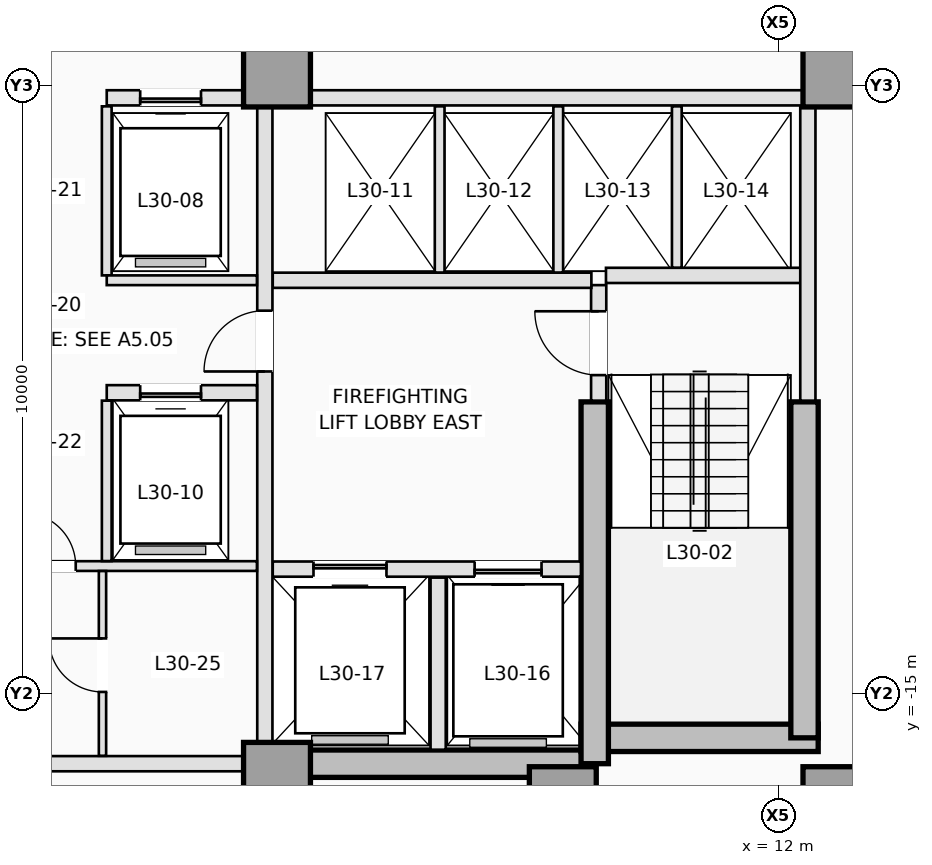
"""IFC4 building model, lengths in metres.
Left out: names, types, materials, properties, quantities, classifications, styles, units other than length and angle.
Written with IfcOpenShell. Run it as: python <this file> out.ifc"""

import sys

from ifc_helpers import new_model, si_unit, direction, frame, frame_2d, origin, origin_2d, place, context, subcontext, project, spatial, rectangle, extrude, element, fill, save


model = new_model("IFC4")
c1 = context("Model", 3, precision=1e-05, world=origin(), true_north=direction((0.0, 1.0)))
c2 = subcontext(c1, "Body", "Model", "MODEL_VIEW")
j1 = project(units=[si_unit("LENGTHUNIT", "METRE"), si_unit("PLANEANGLEUNIT", "RADIAN")], contexts=[c1])
p1 = place(None, origin())
s1 = spatial("IfcSite", under=j1, at=p1, CompositionType="ELEMENT")
p2 = place(p1, origin())
s2 = spatial("IfcBuilding", under=s1, at=p2, CompositionType="ELEMENT")
p3 = place(p2, frame((0.0, 0.0, 112.5)))
s3 = spatial("IfcBuildingStorey", under=s2, at=p3, CompositionType="ELEMENT", Elevation=112.5)
p4 = place(p3, frame((3.75, -16.15, 0.0), z_axis=(0.0, 0.0, 1.0), x_axis=(1.0, 0.0, 0.0)))
e1 = element("IfcWall", 1, at=p4, inside=s3, PredefinedType="SHEAR", context=c2, shape_type="SweptSolid", body=[
    extrude(rectangle(XDim=5.225, YDim=0.45, at=frame_2d((2.613, 0.0))), origin(), (0.0, 0.0, 1.0), 3.5),
])
p5 = place(p3, frame((8.75, -15.725, 0.0), z_axis=(0.0, 0.0, 1.0), x_axis=(1.0, 0.0, 0.0)))
e2 = element("IfcWall", 2, at=p5, inside=s3, PredefinedType="SHEAR", context=c2, shape_type="SweptSolid", body=[
    extrude(rectangle(XDim=3.9, YDim=0.45, at=frame_2d((1.95, 0.0))), origin(), (0.0, 0.0, 1.0), 3.5),
])
p6 = place(p3, frame((12.425, -15.725, 0.0), z_axis=(0.0, 0.0, 1.0), x_axis=(0.0, 1.0, 0.0)))
e3 = element("IfcWall", 3, at=p6, inside=s3, PredefinedType="SHEAR", context=c2, shape_type="SweptSolid", body=[
    extrude(rectangle(XDim=5.525, YDim=0.45, at=frame_2d((2.763, 0.0))), origin(), (0.0, 0.0, 1.0), 3.5),
])
p7 = place(p3, frame((8.975, -16.15, 0.0), z_axis=(0.0, 0.0, 1.0), x_axis=(0.0, 1.0, 0.0)))
e4 = element("IfcWall", 4, at=p7, inside=s3, PredefinedType="SHEAR", context=c2, shape_type="SweptSolid", body=[
    extrude(rectangle(XDim=5.95, YDim=0.45, at=frame_2d((2.975, 0.0))), origin(), (0.0, 0.0, 1.0), 3.5),
])
for number, where, z_axis, x_axis in (
    (5, (3.75, -16.35, 0.0), (0.0, 0.0, 1.0), (1.0, 0.0, 0.0)),
    (6, (8.45, -16.75, 0.0), (0.0, 0.0, 1.0), (1.0, 0.0, 0.0)),
    (7, (12.95, -16.75, 0.0), (0.0, 0.0, 1.0), (1.0, 0.0, 0.0)),
    (8, (3.75, -4.8, 0.0), (0.0, 0.0, 1.0), (1.0, 0.0, 0.0)),
    (9, (12.95, -4.8, 0.0), (0.0, 0.0, 1.0), (1.0, 0.0, 0.0)),
):
    element("IfcColumn", number, at=place(p3, frame(where, z_axis=z_axis, x_axis=x_axis)), inside=s3, PredefinedType="COLUMN", context=c2, shape_type="SweptSolid", body=[
        extrude(rectangle(XDim=1.1, YDim=1.1, at=origin_2d()), origin(), (0.0, 0.0, 1.0), 3.5),
    ])
p8 = place(p3, frame((9.04, -10.18, 0.0), z_axis=(0.0, 0.0, 1.0), x_axis=(0.0, 1.0, 0.0)))
e10 = element("IfcWall", 10, at=p8, inside=s3, PredefinedType="PARTITIONING", context=c2, shape_type="SweptSolid", body=[
    extrude(rectangle(XDim=1.9, YDim=0.25, at=frame_2d((0.95, 0.0))), origin(), (0.0, 0.0, 1.0), 3.25),
])
p9 = place(p8, frame((0.42, 0.0, 0.0)))
e11 = element("IfcOpeningElement", 11, at=p9, cuts=e10, PredefinedType="OPENING", context=c2, shape_type="SweptSolid", body=[
    extrude(rectangle(XDim=1.05, YDim=2.15, at=frame_2d((0.525, 1.075))), frame((0.0, 0.135, 0.0), z_axis=(0.0, -1.0, 0.0), x_axis=(1.0, 0.0, 0.0)), (0.0, 0.0, 1.0), 0.27),
])
p10 = place(p3, frame((9.16, -8.12, 0.0), z_axis=(0.0, 0.0, 1.0), x_axis=(1.0, 0.0, 0.0)))
e12 = element("IfcWall", 12, at=p10, inside=s3, PredefinedType="PARTITIONING", context=c2, shape_type="SweptSolid", body=[
    extrude(rectangle(XDim=3.22, YDim=0.25, at=frame_2d((1.61, 0.0))), origin(), (0.0, 0.0, 1.0), 3.25),
])
p11 = place(p3, frame((12.48, -10.18, 0.0), z_axis=(0.0, 0.0, 1.0), x_axis=(0.0, 1.0, 0.0)))
e13 = element("IfcWall", 13, at=p11, inside=s3, PredefinedType="PARTITIONING", context=c2, shape_type="SweptSolid", body=[
    extrude(rectangle(XDim=4.828, YDim=0.25, at=frame_2d((2.414, 0.0))), origin(), (0.0, 0.0, 1.0), 3.25),
])
p12 = place(p3, frame((3.68, -12.95, 0.0), z_axis=(0.0, 0.0, 1.0), x_axis=(1.0, 0.0, 0.0)))
e14 = element("IfcWall", 14, at=p12, inside=s3, PredefinedType="PARTITIONING", context=c2, shape_type="SweptSolid", body=[
    extrude(rectangle(XDim=5.068, YDim=0.25, at=frame_2d((2.534, 0.0))), origin(), (0.0, 0.0, 1.0), 3.25),
])
p13 = place(p12, frame((3.32, 0.0, 0.0)))
e15 = element("IfcOpeningElement", 15, at=p13, cuts=e14, PredefinedType="OPENING", context=c2, shape_type="SweptSolid", body=[
    extrude(rectangle(XDim=1.1, YDim=2.15, at=frame_2d((0.55, 1.075))), frame((0.0, 0.135, 0.0), z_axis=(0.0, -1.0, 0.0), x_axis=(1.0, 0.0, 0.0)), (0.0, 0.0, 1.0), 0.27),
])
p14 = place(p12, frame((0.67, 0.0, 0.0)))
e16 = element("IfcOpeningElement", 16, at=p14, cuts=e14, PredefinedType="OPENING", context=c2, shape_type="SweptSolid", body=[
    extrude(rectangle(XDim=1.2, YDim=2.15, at=frame_2d((0.6, 1.075))), frame((0.0, 0.135, 0.0), z_axis=(0.0, -1.0, 0.0), x_axis=(1.0, 0.0, 0.0)), (0.0, 0.0, 1.0), 0.27),
])
p15 = place(p3, frame((6.4, -15.92, 0.0), z_axis=(0.0, 0.0, 1.0), x_axis=(0.0, 1.0, 0.0)))
e17 = element("IfcWall", 17, at=p15, inside=s3, PredefinedType="PARTITIONING", context=c2, shape_type="SweptSolid", body=[
    extrude(rectangle(XDim=2.83, YDim=0.25, at=frame_2d((1.415, 0.0))), origin(), (0.0, 0.0, 1.0), 3.25),
])
p16 = place(p3, frame((3.68, -8.2, 0.0), z_axis=(0.0, 0.0, 1.0), x_axis=(1.0, 0.0, 0.0)))
e18 = element("IfcWall", 18, at=p16, inside=s3, PredefinedType="PARTITIONING", context=c2, shape_type="SweptSolid", body=[
    extrude(rectangle(XDim=5.24, YDim=0.25, at=frame_2d((2.62, 0.0))), origin(), (0.0, 0.0, 1.0), 3.25),
])
p17 = place(p3, frame((3.55, -15.798, 0.0), z_axis=(0.0, 0.0, 1.0), x_axis=(0.0, 1.0, 0.0)))
e19 = element("IfcWall", 19, at=p17, inside=s3, PredefinedType="PARTITIONING", context=c2, shape_type="SweptSolid", body=[
    extrude(rectangle(XDim=10.446, YDim=0.25, at=frame_2d((5.223, 0.0))), origin(), (0.0, 0.0, 1.0), 3.25),
])
p18 = place(p17, frame((6.098, 0.0, 0.0)))
e20 = element("IfcOpeningElement", 20, at=p18, cuts=e19, PredefinedType="OPENING", context=c2, shape_type="SweptSolid", body=[
    extrude(rectangle(XDim=1.0, YDim=2.15, at=frame_2d((0.5, 1.075))), frame((0.0, 0.135, 0.0), z_axis=(0.0, -1.0, 0.0), x_axis=(1.0, 0.0, 0.0)), (0.0, 0.0, 1.0), 0.27),
])
p19 = place(p3, frame((4.302, -5.2, 0.0), z_axis=(0.0, 0.0, 1.0), x_axis=(1.0, 0.0, 0.0)))
e21 = element("IfcWall", 21, at=p19, inside=s3, PredefinedType="PARTITIONING", context=c2, shape_type="SweptSolid", body=[
    extrude(rectangle(XDim=8.096, YDim=0.25, at=frame_2d((4.048, 0.0))), origin(), (0.0, 0.0, 1.0), 3.25),
])
p20 = place(p3, frame((0.95, -5.2, 0.0), z_axis=(0.0, 0.0, 1.0), x_axis=(1.0, 0.0, 0.0)))
e22 = element("IfcWall", 22, at=p20, inside=s3, PredefinedType="PARTITIONING", context=c2, shape_type="SweptSolid", body=[
    extrude(rectangle(XDim=2.248, YDim=0.25, at=frame_2d((1.124, 0.0))), origin(), (0.0, 0.0, 1.0), 3.25),
])
p21 = place(p20, frame((0.55, 0.0, 0.0)))
e23 = element("IfcOpeningElement", 23, at=p21, cuts=e22, PredefinedType="OPENING", context=c2, shape_type="SweptSolid", body=[
    extrude(rectangle(XDim=1.0, YDim=2.15, at=frame_2d((0.5, 1.075))), frame((0.0, 0.135, 0.0), z_axis=(0.0, -1.0, 0.0), x_axis=(1.0, 0.0, 0.0)), (0.0, 0.0, 1.0), 0.27),
])
for number, where, z_axis, x_axis in (
    (24, (6.425, -8.073, 0.0), (0.0, 0.0, 1.0), (0.0, 1.0, 0.0)),
    (25, (8.375, -8.073, 0.0), (0.0, 0.0, 1.0), (0.0, 1.0, 0.0)),
):
    element("IfcWall", number, at=place(p3, frame(where, z_axis=z_axis, x_axis=x_axis)), inside=s3, PredefinedType="PARTITIONING", context=c2, shape_type="SweptSolid", body=[
        extrude(rectangle(XDim=2.733, YDim=0.16, at=frame_2d((1.366, 0.0))), origin(), (0.0, 0.0, 1.0), 3.25),
    ])
p22 = place(p3, frame((10.325, -7.993, 0.0), z_axis=(0.0, 0.0, 1.0), x_axis=(0.0, 1.0, 0.0)))
e26 = element("IfcWall", 26, at=p22, inside=s3, PredefinedType="PARTITIONING", context=c2, shape_type="SweptSolid", body=[
    extrude(rectangle(XDim=2.653, YDim=0.16, at=frame_2d((1.326, 0.0))), origin(), (0.0, 0.0, 1.0), 3.25),
])
p23 = place(p3, frame((-3.198, -16.15, 0.0), z_axis=(0.0, 0.0, 1.0), x_axis=(1.0, 0.0, 0.0)))
e27 = element("IfcWall", 27, at=p23, inside=s3, PredefinedType="PARTITIONING", context=c2, shape_type="SweptSolid", body=[
    extrude(rectangle(XDim=6.396, YDim=0.25, at=frame_2d((3.198, 0.0))), origin(), (0.0, 0.0, 1.0), 2.3),
])
p24 = place(p3, frame((0.95, -8.12, 0.0), z_axis=(0.0, 0.0, 1.0), x_axis=(0.0, 1.0, 0.0)))
e28 = element("IfcWall", 28, at=p24, inside=s3, PredefinedType="PARTITIONING", context=c2, shape_type="SweptSolid", body=[
    extrude(rectangle(XDim=2.78, YDim=0.16, at=frame_2d((1.39, 0.0))), origin(), (0.0, 0.0, 1.0), 3.25),
])
p25 = place(p3, frame((0.95, -8.2, 0.0), z_axis=(0.0, 0.0, 1.0), x_axis=(1.0, 0.0, 0.0)))
e29 = element("IfcWall", 29, at=p25, inside=s3, PredefinedType="PARTITIONING", context=c2, shape_type="SweptSolid", body=[
    extrude(rectangle(XDim=2.47, YDim=0.16, at=frame_2d((1.235, 0.0))), origin(), (0.0, 0.0, 1.0), 3.25),
])
p26 = place(p3, frame((0.95, -10.05, 0.0), z_axis=(0.0, 0.0, 1.0), x_axis=(1.0, 0.0, 0.0)))
e30 = element("IfcWall", 30, at=p26, inside=s3, PredefinedType="PARTITIONING", context=c2, shape_type="SweptSolid", body=[
    extrude(rectangle(XDim=2.47, YDim=0.25, at=frame_2d((1.235, 0.0))), origin(), (0.0, 0.0, 1.0), 3.25),
])
p27 = place(p26, frame((0.55, 0.0, 0.0)))
e31 = element("IfcOpeningElement", 31, at=p27, cuts=e30, PredefinedType="OPENING", context=c2, shape_type="SweptSolid", body=[
    extrude(rectangle(XDim=1.0, YDim=2.15, at=frame_2d((0.5, 1.075))), frame((0.0, 0.135, 0.0), z_axis=(0.0, -1.0, 0.0), x_axis=(1.0, 0.0, 0.0)), (0.0, 0.0, 1.0), 0.27),
])
p28 = place(p3, frame((-3.42, -12.9, 0.0), z_axis=(0.0, 0.0, 1.0), x_axis=(1.0, 0.0, 0.0)))
e32 = element("IfcWall", 32, at=p28, inside=s3, PredefinedType="PARTITIONING", context=c2, shape_type="SweptSolid", body=[
    extrude(rectangle(XDim=6.84, YDim=0.16, at=frame_2d((3.42, 0.0))), origin(), (0.0, 0.0, 1.0), 3.25),
])
p29 = place(p28, frame((2.98, 0.0, 0.0)))
e33 = element("IfcOpeningElement", 33, at=p29, cuts=e32, PredefinedType="OPENING", context=c2, shape_type="SweptSolid", body=[
    extrude(rectangle(XDim=0.88, YDim=2.12, at=frame_2d((0.44, 1.06))), frame((0.0, 0.09, 0.0), z_axis=(0.0, -1.0, 0.0), x_axis=(1.0, 0.0, 0.0)), (0.0, 0.0, 1.0), 0.18),
])
p30 = place(p3, frame((0.95, -12.818, 0.0), z_axis=(0.0, 0.0, 1.0), x_axis=(0.0, 1.0, 0.0)))
e34 = element("IfcWall", 34, at=p30, inside=s3, PredefinedType="PARTITIONING", context=c2, shape_type="SweptSolid", body=[
    extrude(rectangle(XDim=2.638, YDim=0.16, at=frame_2d((1.319, 0.0))), origin(), (0.0, 0.0, 1.0), 3.25),
])
p31 = place(p3, frame((0.88, -16.02, 0.0), z_axis=(0.0, 0.0, 1.0), x_axis=(0.0, 1.0, 0.0)))
e35 = element("IfcWall", 35, at=p31, inside=s3, PredefinedType="PARTITIONING", context=c2, shape_type="SweptSolid", body=[
    extrude(rectangle(XDim=3.038, YDim=0.12, at=frame_2d((1.519, 0.0))), origin(), (0.0, 0.0, 1.0), 3.25),
])
p32 = place(p31, frame((1.05, 0.0, 0.0)))
e36 = element("IfcOpeningElement", 36, at=p32, cuts=e35, PredefinedType="OPENING", context=c2, shape_type="SweptSolid", body=[
    extrude(rectangle(XDim=0.88, YDim=2.12, at=frame_2d((0.44, 1.06))), frame((0.0, 0.07, 0.0), z_axis=(0.0, -1.0, 0.0), x_axis=(1.0, 0.0, 0.0)), (0.0, 0.0, 1.0), 0.14),
])
p33 = place(p21, origin())
e37 = element("IfcDoor", 37, at=p33, inside=s3, OperationType="SLIDING_TO_RIGHT", PredefinedType="DOOR", context=c2, shape_type="SweptSolid", body=[
    extrude(rectangle(XDim=1.0, YDim=2.15, at=frame_2d((0.5, 1.075))), frame((0.0, 0.025, 0.0), z_axis=(0.0, -1.0, 0.0), x_axis=(1.0, 0.0, 0.0)), (0.0, 0.0, 1.0), 0.05),
])
fill(e23, e37)
p34 = place(p13, origin())
e38 = element("IfcDoor", 38, at=p34, inside=s3, OperationType="SLIDING_TO_RIGHT", PredefinedType="DOOR", context=c2, shape_type="SweptSolid", body=[
    extrude(rectangle(XDim=1.1, YDim=2.15, at=frame_2d((0.55, 1.075))), frame((0.0, 0.025, 0.0), z_axis=(0.0, -1.0, 0.0), x_axis=(1.0, 0.0, 0.0)), (0.0, 0.0, 1.0), 0.05),
])
fill(e15, e38)
p35 = place(p14, origin())
e39 = element("IfcDoor", 39, at=p35, inside=s3, OperationType="SLIDING_TO_LEFT", PredefinedType="DOOR", context=c2, shape_type="SweptSolid", body=[
    extrude(rectangle(XDim=1.2, YDim=2.15, at=frame_2d((0.6, 1.075))), frame((0.0, 0.025, 0.0), z_axis=(0.0, -1.0, 0.0), x_axis=(1.0, 0.0, 0.0)), (0.0, 0.0, 1.0), 0.05),
])
fill(e16, e39)
p36 = place(p27, origin())
e40 = element("IfcDoor", 40, at=p36, inside=s3, OperationType="SLIDING_TO_RIGHT", PredefinedType="DOOR", context=c2, shape_type="SweptSolid", body=[
    extrude(rectangle(XDim=1.0, YDim=2.15, at=frame_2d((0.5, 1.075))), frame((0.0, 0.025, 0.0), z_axis=(0.0, -1.0, 0.0), x_axis=(1.0, 0.0, 0.0)), (0.0, 0.0, 1.0), 0.05),
])
fill(e31, e40)
p37 = place(p9, origin())
e41 = element("IfcDoor", 41, at=p37, inside=s3, OperationType="SINGLE_SWING_RIGHT", PredefinedType="DOOR", context=c2, shape_type="SweptSolid", body=[
    extrude(rectangle(XDim=1.05, YDim=2.15, at=frame_2d((0.525, 1.075))), frame((0.0, 0.025, 0.0), z_axis=(0.0, -1.0, 0.0), x_axis=(1.0, 0.0, 0.0)), (0.0, 0.0, 1.0), 0.05),
])
fill(e11, e41)
p38 = place(p18, origin())
e42 = element("IfcDoor", 42, at=p38, inside=s3, OperationType="SINGLE_SWING_LEFT", PredefinedType="DOOR", context=c2, shape_type="SweptSolid", body=[
    extrude(rectangle(XDim=1.0, YDim=2.15, at=frame_2d((0.5, 1.075))), frame((0.0, 0.025, 0.0), z_axis=(0.0, -1.0, 0.0), x_axis=(1.0, 0.0, 0.0)), (0.0, 0.0, 1.0), 0.05),
])
fill(e20, e42)
p39 = place(p29, origin())
e43 = element("IfcDoor", 43, at=p39, inside=s3, OperationType="SINGLE_SWING_LEFT", PredefinedType="DOOR", context=c2, shape_type="SweptSolid", body=[
    extrude(rectangle(XDim=0.88, YDim=2.12, at=frame_2d((0.44, 1.06))), frame((0.0, 0.025, 0.0), z_axis=(0.0, -1.0, 0.0), x_axis=(1.0, 0.0, 0.0)), (0.0, 0.0, 1.0), 0.05),
])
fill(e33, e43)
p40 = place(p32, origin())
e44 = element("IfcDoor", 44, at=p40, inside=s3, OperationType="SINGLE_SWING_RIGHT", PredefinedType="DOOR", context=c2, shape_type="SweptSolid", body=[
    extrude(rectangle(XDim=0.88, YDim=2.12, at=frame_2d((0.44, 1.06))), frame((0.0, 0.025, 0.0), z_axis=(0.0, -1.0, 0.0), x_axis=(1.0, 0.0, 0.0)), (0.0, 0.0, 1.0), 0.05),
])
fill(e36, e44)
save(model, sys.argv[1])
